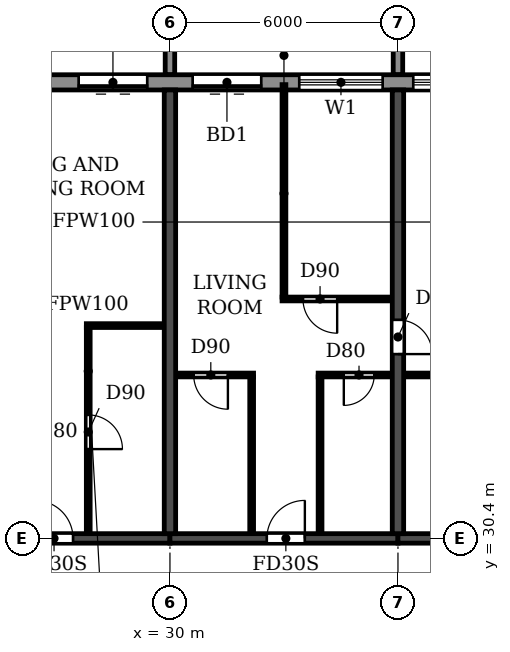
"""IFC4 building model, lengths in metres.
Left out: names, types, materials, properties, quantities, classifications, styles, units other than length and angle.
Written with IfcOpenShell. Run it as: python <this file> out.ifc"""

import sys

from ifc_helpers import new_model, si_unit, direction, frame, frame_2d, origin, place, context, subcontext, project, spatial, polyline, rectangle, outline, extrude, source, transform, mapped, element, fill, save


model = new_model("IFC4")
c1 = context("Model", 3, precision=1e-05, world=origin(), true_north=direction((0.0, 1.0)))
c2 = subcontext(c1, "Body", "Model", "MODEL_VIEW")
j1 = project(units=[si_unit("LENGTHUNIT", "METRE"), si_unit("PLANEANGLEUNIT", "RADIAN")], contexts=[c1])
p1 = place(None, origin())
s1 = spatial("IfcSite", under=j1, at=p1, CompositionType="ELEMENT")
p2 = place(p1, origin())
s2 = spatial("IfcBuilding", under=s1, at=p2, CompositionType="ELEMENT")
p3 = place(p2, frame((0.0, 0.0, 155.4)))
s3 = spatial("IfcBuildingStorey", under=s2, at=p3, CompositionType="ELEMENT", Elevation=155.4)
p4 = place(p3, frame((30.0, 30.525, 0.0), z_axis=(0.0, 0.0, 1.0), x_axis=(0.0, 1.0, 0.0)))
e1 = element("IfcWall", 1, at=p4, inside=s3, PredefinedType="SHEAR", context=c2, shape_type="SweptSolid", body=[
    extrude(rectangle(XDim=11.675, YDim=0.3, at=frame_2d((5.837, 0.0))), origin(), (0.0, 0.0, 1.0), 3.0),
])
p5 = place(p3, frame((36.0, 30.525, 0.0), z_axis=(0.0, 0.0, 1.0), x_axis=(0.0, 1.0, 0.0)))
e2 = element("IfcWall", 2, at=p5, inside=s3, PredefinedType="SHEAR", context=c2, shape_type="SweptSolid", body=[
    extrude(rectangle(XDim=11.675, YDim=0.3, at=frame_2d((5.837, 0.0))), origin(), (0.0, 0.0, 1.0), 3.0),
])
p6 = place(p5, frame((4.725, 0.0, 0.0)))
e3 = element("IfcOpeningElement", 3, at=p6, cuts=e2, PredefinedType="OPENING", context=c2, shape_type="SweptSolid", body=[
    extrude(rectangle(XDim=0.9, YDim=2.1, at=frame_2d((0.45, 1.05))), frame((0.0, 0.16, 0.0), z_axis=(0.0, -1.0, 0.0), x_axis=(1.0, 0.0, 0.0)), (0.0, 0.0, 1.0), 0.32),
])
p7 = place(p3, frame((24.0, 30.4, 0.0), z_axis=(0.0, 0.0, 1.0), x_axis=(1.0, 0.0, 0.0)))
e4 = element("IfcWall", 4, at=p7, inside=s3, PredefinedType="SHEAR", context=c2, shape_type="SweptSolid", body=[
    extrude(rectangle(XDim=6.0, YDim=0.25, at=frame_2d((3.0, 0.0))), origin(), (0.0, 0.0, 1.0), 2.4),
])
p8 = place(p7, frame((2.45, 0.0, 0.0)))
e5 = element("IfcOpeningElement", 5, at=p8, cuts=e4, PredefinedType="OPENING", context=c2, shape_type="SweptSolid", body=[
    extrude(rectangle(XDim=1.0, YDim=2.1, at=frame_2d((0.5, 1.05))), frame((0.0, 0.135, 0.0), z_axis=(0.0, -1.0, 0.0), x_axis=(1.0, 0.0, 0.0)), (0.0, 0.0, 1.0), 0.27),
])
p9 = place(p3, frame((30.0, 30.4, 0.0), z_axis=(0.0, 0.0, 1.0), x_axis=(1.0, 0.0, 0.0)))
e6 = element("IfcWall", 6, at=p9, inside=s3, PredefinedType="SHEAR", context=c2, shape_type="SweptSolid", body=[
    extrude(rectangle(XDim=6.0, YDim=0.25, at=frame_2d((3.0, 0.0))), origin(), (0.0, 0.0, 1.0), 2.4),
])
p10 = place(p9, frame((2.55, 0.0, 0.0)))
e7 = element("IfcOpeningElement", 7, at=p10, cuts=e6, PredefinedType="OPENING", context=c2, shape_type="SweptSolid", body=[
    extrude(rectangle(XDim=1.0, YDim=2.1, at=frame_2d((0.5, 1.05))), frame((0.0, 0.135, 0.0), z_axis=(0.0, -1.0, 0.0), x_axis=(1.0, 0.0, 0.0)), (0.0, 0.0, 1.0), 0.27),
])
p11 = place(p3, frame((36.0, 30.4, 0.0), z_axis=(0.0, 0.0, 1.0), x_axis=(1.0, 0.0, 0.0)))
e8 = element("IfcWall", 8, at=p11, inside=s3, PredefinedType="SHEAR", context=c2, shape_type="SweptSolid", body=[
    extrude(rectangle(XDim=6.0, YDim=0.25, at=frame_2d((3.0, 0.0))), origin(), (0.0, 0.0, 1.0), 2.4),
])
p12 = place(p3, frame((85.317, 42.4, 0.0), z_axis=(0.0, 0.0, 1.0), x_axis=(-1.0, 0.0, 0.0)))
e9 = element("IfcWall", 9, at=p12, inside=s3, PredefinedType="STANDARD", context=c2, shape_type="SweptSolid", body=[
    extrude(rectangle(XDim=68.634, YDim=0.4, at=frame_2d((34.317, 0.0))), origin(), (0.0, 0.0, 1.0), 3.0),
])
p13 = place(p12, frame((64.917, 0.0, 0.0)))
e10 = element("IfcOpeningElement", 10, at=p13, cuts=e9, PredefinedType="OPENING", context=c2, shape_type="SweptSolid", body=[
    extrude(rectangle(XDim=1.8, YDim=2.4, at=frame_2d((0.9, 1.2))), frame((0.0, 0.21, 0.0), z_axis=(0.0, -1.0, 0.0), x_axis=(1.0, 0.0, 0.0)), (0.0, 0.0, 1.0), 0.42),
])
p14 = place(p12, frame((61.717, 0.0, 0.9)))
e11 = element("IfcOpeningElement", 11, at=p14, cuts=e9, PredefinedType="OPENING", context=c2, shape_type="SweptSolid", body=[
    extrude(rectangle(XDim=2.2, YDim=1.5, at=frame_2d((1.1, 0.75))), frame((0.0, 0.21, 0.0), z_axis=(0.0, -1.0, 0.0), x_axis=(1.0, 0.0, 0.0)), (0.0, 0.0, 1.0), 0.42),
])
p15 = place(p12, frame((58.717, 0.0, 0.9)))
e12 = element("IfcOpeningElement", 12, at=p15, cuts=e9, PredefinedType="OPENING", context=c2, shape_type="SweptSolid", body=[
    extrude(rectangle(XDim=2.2, YDim=1.5, at=frame_2d((1.1, 0.75))), frame((0.0, 0.21, 0.0), z_axis=(0.0, -1.0, 0.0), x_axis=(1.0, 0.0, 0.0)), (0.0, 0.0, 1.0), 0.42),
])
p16 = place(p12, frame((55.917, 0.0, 0.0)))
e13 = element("IfcOpeningElement", 13, at=p16, cuts=e9, PredefinedType="OPENING", context=c2, shape_type="SweptSolid", body=[
    extrude(rectangle(XDim=1.8, YDim=2.4, at=frame_2d((0.9, 1.2))), frame((0.0, 0.21, 0.0), z_axis=(0.0, -1.0, 0.0), x_axis=(1.0, 0.0, 0.0)), (0.0, 0.0, 1.0), 0.42),
])
p17 = place(p12, frame((52.917, 0.0, 0.0)))
e14 = element("IfcOpeningElement", 14, at=p17, cuts=e9, PredefinedType="OPENING", context=c2, shape_type="SweptSolid", body=[
    extrude(rectangle(XDim=1.8, YDim=2.4, at=frame_2d((0.9, 1.2))), frame((0.0, 0.21, 0.0), z_axis=(0.0, -1.0, 0.0), x_axis=(1.0, 0.0, 0.0)), (0.0, 0.0, 1.0), 0.42),
])
p18 = place(p12, frame((49.717, 0.0, 0.9)))
e15 = element("IfcOpeningElement", 15, at=p18, cuts=e9, PredefinedType="OPENING", context=c2, shape_type="SweptSolid", body=[
    extrude(rectangle(XDim=2.2, YDim=1.5, at=frame_2d((1.1, 0.75))), frame((0.0, 0.21, 0.0), z_axis=(0.0, -1.0, 0.0), x_axis=(1.0, 0.0, 0.0)), (0.0, 0.0, 1.0), 0.42),
])
p19 = place(p12, frame((46.717, 0.0, 0.9)))
e16 = element("IfcOpeningElement", 16, at=p19, cuts=e9, PredefinedType="OPENING", context=c2, shape_type="SweptSolid", body=[
    extrude(rectangle(XDim=2.2, YDim=1.5, at=frame_2d((1.1, 0.75))), frame((0.0, 0.21, 0.0), z_axis=(0.0, -1.0, 0.0), x_axis=(1.0, 0.0, 0.0)), (0.0, 0.0, 1.0), 0.42),
])
p20 = place(p12, frame((43.717, 0.0, 0.9)))
e17 = element("IfcOpeningElement", 17, at=p20, cuts=e9, PredefinedType="OPENING", context=c2, shape_type="SweptSolid", body=[
    extrude(rectangle(XDim=2.2, YDim=1.5, at=frame_2d((1.1, 0.75))), frame((0.0, 0.21, 0.0), z_axis=(0.0, -1.0, 0.0), x_axis=(1.0, 0.0, 0.0)), (0.0, 0.0, 1.0), 0.42),
])
p21 = place(p12, frame((40.917, 0.0, 0.0)))
e18 = element("IfcOpeningElement", 18, at=p21, cuts=e9, PredefinedType="OPENING", context=c2, shape_type="SweptSolid", body=[
    extrude(rectangle(XDim=1.8, YDim=2.4, at=frame_2d((0.9, 1.2))), frame((0.0, 0.21, 0.0), z_axis=(0.0, -1.0, 0.0), x_axis=(1.0, 0.0, 0.0)), (0.0, 0.0, 1.0), 0.42),
])
p22 = place(p12, frame((37.717, 0.0, 0.9)))
e19 = element("IfcOpeningElement", 19, at=p22, cuts=e9, PredefinedType="OPENING", context=c2, shape_type="SweptSolid", body=[
    extrude(rectangle(XDim=2.2, YDim=1.5, at=frame_2d((1.1, 0.75))), frame((0.0, 0.21, 0.0), z_axis=(0.0, -1.0, 0.0), x_axis=(1.0, 0.0, 0.0)), (0.0, 0.0, 1.0), 0.42),
])
p23 = place(p12, frame((34.917, 0.0, 0.0)))
e20 = element("IfcOpeningElement", 20, at=p23, cuts=e9, PredefinedType="OPENING", context=c2, shape_type="SweptSolid", body=[
    extrude(rectangle(XDim=1.8, YDim=2.4, at=frame_2d((0.9, 1.2))), frame((0.0, 0.21, 0.0), z_axis=(0.0, -1.0, 0.0), x_axis=(1.0, 0.0, 0.0)), (0.0, 0.0, 1.0), 0.42),
])
p24 = place(p12, frame((31.717, 0.0, 0.9)))
e21 = element("IfcOpeningElement", 21, at=p24, cuts=e9, PredefinedType="OPENING", context=c2, shape_type="SweptSolid", body=[
    extrude(rectangle(XDim=2.2, YDim=1.5, at=frame_2d((1.1, 0.75))), frame((0.0, 0.21, 0.0), z_axis=(0.0, -1.0, 0.0), x_axis=(1.0, 0.0, 0.0)), (0.0, 0.0, 1.0), 0.42),
])
p25 = place(p12, frame((28.717, 0.0, 0.9)))
e22 = element("IfcOpeningElement", 22, at=p25, cuts=e9, PredefinedType="OPENING", context=c2, shape_type="SweptSolid", body=[
    extrude(rectangle(XDim=2.2, YDim=1.5, at=frame_2d((1.1, 0.75))), frame((0.0, 0.21, 0.0), z_axis=(0.0, -1.0, 0.0), x_axis=(1.0, 0.0, 0.0)), (0.0, 0.0, 1.0), 0.42),
])
p26 = place(p12, frame((25.717, 0.0, 0.9)))
e23 = element("IfcOpeningElement", 23, at=p26, cuts=e9, PredefinedType="OPENING", context=c2, shape_type="SweptSolid", body=[
    extrude(rectangle(XDim=2.2, YDim=1.5, at=frame_2d((1.1, 0.75))), frame((0.0, 0.21, 0.0), z_axis=(0.0, -1.0, 0.0), x_axis=(1.0, 0.0, 0.0)), (0.0, 0.0, 1.0), 0.42),
])
p27 = place(p12, frame((22.717, 0.0, 0.9)))
e24 = element("IfcOpeningElement", 24, at=p27, cuts=e9, PredefinedType="OPENING", context=c2, shape_type="SweptSolid", body=[
    extrude(rectangle(XDim=2.2, YDim=1.5, at=frame_2d((1.1, 0.75))), frame((0.0, 0.21, 0.0), z_axis=(0.0, -1.0, 0.0), x_axis=(1.0, 0.0, 0.0)), (0.0, 0.0, 1.0), 0.42),
])
p28 = place(p12, frame((19.917, 0.0, 0.0)))
e25 = element("IfcOpeningElement", 25, at=p28, cuts=e9, PredefinedType="OPENING", context=c2, shape_type="SweptSolid", body=[
    extrude(rectangle(XDim=1.8, YDim=2.4, at=frame_2d((0.9, 1.2))), frame((0.0, 0.21, 0.0), z_axis=(0.0, -1.0, 0.0), x_axis=(1.0, 0.0, 0.0)), (0.0, 0.0, 1.0), 0.42),
])
p29 = place(p12, frame((16.717, 0.0, 0.9)))
e26 = element("IfcOpeningElement", 26, at=p29, cuts=e9, PredefinedType="OPENING", context=c2, shape_type="SweptSolid", body=[
    extrude(rectangle(XDim=2.2, YDim=1.5, at=frame_2d((1.1, 0.75))), frame((0.0, 0.21, 0.0), z_axis=(0.0, -1.0, 0.0), x_axis=(1.0, 0.0, 0.0)), (0.0, 0.0, 1.0), 0.42),
])
p30 = place(p12, frame((13.717, 0.0, 0.9)))
e27 = element("IfcOpeningElement", 27, at=p30, cuts=e9, PredefinedType="OPENING", context=c2, shape_type="SweptSolid", body=[
    extrude(rectangle(XDim=2.2, YDim=1.5, at=frame_2d((1.1, 0.75))), frame((0.0, 0.21, 0.0), z_axis=(0.0, -1.0, 0.0), x_axis=(1.0, 0.0, 0.0)), (0.0, 0.0, 1.0), 0.42),
])
p31 = place(p12, frame((10.917, 0.0, 0.0)))
e28 = element("IfcOpeningElement", 28, at=p31, cuts=e9, PredefinedType="OPENING", context=c2, shape_type="SweptSolid", body=[
    extrude(rectangle(XDim=1.8, YDim=2.4, at=frame_2d((0.9, 1.2))), frame((0.0, 0.21, 0.0), z_axis=(0.0, -1.0, 0.0), x_axis=(1.0, 0.0, 0.0)), (0.0, 0.0, 1.0), 0.42),
])
p32 = place(p12, frame((7.717, 0.0, 0.9)))
e29 = element("IfcOpeningElement", 29, at=p32, cuts=e9, PredefinedType="OPENING", context=c2, shape_type="SweptSolid", body=[
    extrude(rectangle(XDim=2.2, YDim=1.5, at=frame_2d((1.1, 0.75))), frame((0.0, 0.21, 0.0), z_axis=(0.0, -1.0, 0.0), x_axis=(1.0, 0.0, 0.0)), (0.0, 0.0, 1.0), 0.42),
])
p33 = place(p12, frame((4.717, 0.0, 0.9)))
e30 = element("IfcOpeningElement", 30, at=p33, cuts=e9, PredefinedType="OPENING", context=c2, shape_type="SweptSolid", body=[
    extrude(rectangle(XDim=2.2, YDim=1.5, at=frame_2d((1.1, 0.75))), frame((0.0, 0.21, 0.0), z_axis=(0.0, -1.0, 0.0), x_axis=(1.0, 0.0, 0.0)), (0.0, 0.0, 1.0), 0.42),
])
p34 = place(p12, frame((1.917, 0.0, 0.0)))
e31 = element("IfcOpeningElement", 31, at=p34, cuts=e9, PredefinedType="OPENING", context=c2, shape_type="SweptSolid", body=[
    extrude(rectangle(XDim=1.8, YDim=2.4, at=frame_2d((0.9, 1.2))), frame((0.0, 0.21, 0.0), z_axis=(0.0, -1.0, 0.0), x_axis=(1.0, 0.0, 0.0)), (0.0, 0.0, 1.0), 0.42),
])
m1 = source(origin(), c2, "Body", "SweptSolid", [
    extrude(outline(polyline([(0.0, 0.0), (0.25, 0.0), (0.25, 3.1), (0.0, 3.1), (0.0, 0.0)])), origin(), (0.0, 0.0, 1.0), 3.1),
])
for number, where in (
    (32, (29.875, 42.6, 0.0)),
    (33, (35.875, 42.6, 0.0)),
):
    element("IfcWall", number, at=place(p3, frame(where)), inside=s3, PredefinedType="STANDARD", context=c2, shape_type="MappedRepresentation", body=[
        mapped(m1, transform((0.0, 0.0, 0.0))),
    ])
p35 = place(p3, frame((30.16, 34.7, 0.0), z_axis=(0.0, 0.0, 1.0), x_axis=(1.0, 0.0, 0.0)))
e34 = element("IfcWall", 34, at=p35, inside=s3, PredefinedType="PARTITIONING", context=c2, shape_type="SweptSolid", body=[
    extrude(rectangle(XDim=2.04, YDim=0.1, at=frame_2d((1.02, 0.0))), origin(), (0.0, 0.0, 1.0), 3.0),
])
p36 = place(p35, frame((0.465, 0.0, 0.0)))
e35 = element("IfcOpeningElement", 35, at=p36, cuts=e34, PredefinedType="OPENING", context=c2, shape_type="SweptSolid", body=[
    extrude(rectangle(XDim=0.9, YDim=2.1, at=frame_2d((0.45, 1.05))), frame((0.0, 0.06, 0.0), z_axis=(0.0, -1.0, 0.0), x_axis=(1.0, 0.0, 0.0)), (0.0, 0.0, 1.0), 0.12),
])
p37 = place(p3, frame((33.9, 34.7, 0.0), z_axis=(0.0, 0.0, 1.0), x_axis=(1.0, 0.0, 0.0)))
e36 = element("IfcWall", 36, at=p37, inside=s3, PredefinedType="PARTITIONING", context=c2, shape_type="SweptSolid", body=[
    extrude(rectangle(XDim=1.94, YDim=0.1, at=frame_2d((0.97, 0.0))), origin(), (0.0, 0.0, 1.0), 3.0),
])
p38 = place(p37, frame((0.675, 0.0, 0.0)))
e37 = element("IfcOpeningElement", 37, at=p38, cuts=e36, PredefinedType="OPENING", context=c2, shape_type="SweptSolid", body=[
    extrude(rectangle(XDim=0.8, YDim=2.1, at=frame_2d((0.4, 1.05))), frame((0.0, 0.06, 0.0), z_axis=(0.0, -1.0, 0.0), x_axis=(1.0, 0.0, 0.0)), (0.0, 0.0, 1.0), 0.12),
])
p39 = place(p3, frame((36.16, 34.7, 0.0), z_axis=(0.0, 0.0, 1.0), x_axis=(1.0, 0.0, 0.0)))
e38 = element("IfcWall", 38, at=p39, inside=s3, PredefinedType="PARTITIONING", context=c2, shape_type="SweptSolid", body=[
    extrude(rectangle(XDim=2.94, YDim=0.1, at=frame_2d((1.47, 0.0))), origin(), (0.0, 0.0, 1.0), 3.0),
])
p40 = place(p39, frame((0.94, 0.0, 0.0)))
e39 = element("IfcOpeningElement", 39, at=p40, cuts=e38, PredefinedType="OPENING", context=c2, shape_type="SweptSolid", body=[
    extrude(rectangle(XDim=0.8, YDim=2.1, at=frame_2d((0.4, 1.05))), frame((0.0, 0.06, 0.0), z_axis=(0.0, -1.0, 0.0), x_axis=(1.0, 0.0, 0.0)), (0.0, 0.0, 1.0), 0.12),
])
p41 = place(p3, frame((27.8, 36.0, 0.0), z_axis=(0.0, 0.0, 1.0), x_axis=(1.0, 0.0, 0.0)))
e40 = element("IfcWall", 40, at=p41, inside=s3, PredefinedType="PARTITIONING", context=c2, shape_type="SweptSolid", body=[
    extrude(rectangle(XDim=2.04, YDim=0.1, at=frame_2d((1.02, 0.0))), origin(), (0.0, 0.0, 1.0), 3.0),
])
p42 = place(p3, frame((32.95, 36.7, 0.0), z_axis=(0.0, 0.0, 1.0), x_axis=(1.0, 0.0, 0.0)))
e41 = element("IfcWall", 41, at=p42, inside=s3, PredefinedType="PARTITIONING", context=c2, shape_type="SweptSolid", body=[
    extrude(rectangle(XDim=2.89, YDim=0.1, at=frame_2d((1.445, 0.0))), origin(), (0.0, 0.0, 1.0), 3.0),
])
p43 = place(p42, frame((0.55, 0.0, 0.0)))
e42 = element("IfcOpeningElement", 42, at=p43, cuts=e41, PredefinedType="OPENING", context=c2, shape_type="SweptSolid", body=[
    extrude(rectangle(XDim=0.9, YDim=2.1, at=frame_2d((0.45, 1.05))), frame((0.0, 0.06, 0.0), z_axis=(0.0, -1.0, 0.0), x_axis=(1.0, 0.0, 0.0)), (0.0, 0.0, 1.0), 0.12),
])
p44 = place(p3, frame((27.85, 30.535, 0.0), z_axis=(0.0, 0.0, 1.0), x_axis=(0.0, 1.0, 0.0)))
e43 = element("IfcWall", 43, at=p44, inside=s3, PredefinedType="PARTITIONING", context=c2, shape_type="SweptSolid", body=[
    extrude(rectangle(XDim=5.415, YDim=0.1, at=frame_2d((2.708, 0.0))), origin(), (0.0, 0.0, 1.0), 3.0),
])
p45 = place(p44, frame((2.215, 0.0, 0.0)))
e44 = element("IfcOpeningElement", 44, at=p45, cuts=e43, PredefinedType="OPENING", context=c2, shape_type="SweptSolid", body=[
    extrude(rectangle(XDim=0.9, YDim=2.1, at=frame_2d((0.45, 1.05))), frame((0.0, 0.06, 0.0), z_axis=(0.0, -1.0, 0.0), x_axis=(1.0, 0.0, 0.0)), (0.0, 0.0, 1.0), 0.12),
])
p46 = place(p3, frame((32.15, 30.535, 0.0), z_axis=(0.0, 0.0, 1.0), x_axis=(0.0, 1.0, 0.0)))
e45 = element("IfcWall", 45, at=p46, inside=s3, PredefinedType="PARTITIONING", context=c2, shape_type="SweptSolid", body=[
    extrude(rectangle(XDim=4.115, YDim=0.1, at=frame_2d((2.058, 0.0))), origin(), (0.0, 0.0, 1.0), 3.0),
])
p47 = place(p3, frame((33.0, 36.75, 0.0), z_axis=(0.0, 0.0, 1.0), x_axis=(0.0, 1.0, 0.0)))
e46 = element("IfcWall", 46, at=p47, inside=s3, PredefinedType="PARTITIONING", context=c2, shape_type="SweptSolid", body=[
    extrude(rectangle(XDim=5.59, YDim=0.1, at=frame_2d((2.795, 0.0))), origin(), (0.0, 0.0, 1.0), 3.0),
])
p48 = place(p3, frame((33.95, 30.535, 0.0), z_axis=(0.0, 0.0, 1.0), x_axis=(0.0, 1.0, 0.0)))
e47 = element("IfcWall", 47, at=p48, inside=s3, PredefinedType="PARTITIONING", context=c2, shape_type="SweptSolid", body=[
    extrude(rectangle(XDim=4.115, YDim=0.1, at=frame_2d((2.058, 0.0))), origin(), (0.0, 0.0, 1.0), 3.0),
])
p49 = place(p16, origin())
e48 = element("IfcDoor", 48, at=p49, inside=s3, OperationType="DOUBLE_DOOR_SLIDING", PredefinedType="DOOR", context=c2, shape_type="SweptSolid", body=[
    extrude(rectangle(XDim=1.8, YDim=2.4, at=frame_2d((0.9, 1.2))), frame((0.0, 0.025, 0.0), z_axis=(0.0, -1.0, 0.0), x_axis=(1.0, 0.0, 0.0)), (0.0, 0.0, 1.0), 0.05),
])
fill(e13, e48)
p50 = place(p17, origin())
e49 = element("IfcDoor", 49, at=p50, inside=s3, OperationType="DOUBLE_DOOR_SLIDING", PredefinedType="DOOR", context=c2, shape_type="SweptSolid", body=[
    extrude(rectangle(XDim=1.8, YDim=2.4, at=frame_2d((0.9, 1.2))), frame((0.0, 0.025, 0.0), z_axis=(0.0, -1.0, 0.0), x_axis=(1.0, 0.0, 0.0)), (0.0, 0.0, 1.0), 0.05),
])
fill(e14, e49)
p51 = place(p18, origin())
e50 = element("IfcWindow", 50, at=p51, inside=s3, PartitioningType="DOUBLE_PANEL_HORIZONTAL", PredefinedType="WINDOW", context=c2, shape_type="SweptSolid", body=[
    extrude(rectangle(XDim=2.2, YDim=1.5, at=frame_2d((1.1, 0.75))), frame((0.0, 0.03, 0.0), z_axis=(0.0, -1.0, 0.0), x_axis=(1.0, 0.0, 0.0)), (0.0, 0.0, 1.0), 0.06),
])
fill(e15, e50)
p52 = place(p19, origin())
e51 = element("IfcWindow", 51, at=p52, inside=s3, PartitioningType="DOUBLE_PANEL_HORIZONTAL", PredefinedType="WINDOW", context=c2, shape_type="SweptSolid", body=[
    extrude(rectangle(XDim=2.2, YDim=1.5, at=frame_2d((1.1, 0.75))), frame((0.0, 0.03, 0.0), z_axis=(0.0, -1.0, 0.0), x_axis=(1.0, 0.0, 0.0)), (0.0, 0.0, 1.0), 0.06),
])
fill(e16, e51)
p53 = place(p8, origin())
e52 = element("IfcDoor", 52, at=p53, inside=s3, OperationType="SINGLE_SWING_LEFT", PredefinedType="DOOR", context=c2, shape_type="SweptSolid", body=[
    extrude(rectangle(XDim=1.0, YDim=2.1, at=frame_2d((0.5, 1.05))), frame((0.0, 0.025, 0.0), z_axis=(0.0, -1.0, 0.0), x_axis=(1.0, 0.0, 0.0)), (0.0, 0.0, 1.0), 0.05),
])
fill(e5, e52)
p54 = place(p45, frame((0.9, 0.0, 0.0), z_axis=(0.0, 0.0, 1.0), x_axis=(-1.0, 0.0, 0.0)))
e53 = element("IfcDoor", 53, at=p54, inside=s3, OperationType="SINGLE_SWING_RIGHT", PredefinedType="DOOR", context=c2, shape_type="SweptSolid", body=[
    extrude(rectangle(XDim=0.9, YDim=2.1, at=frame_2d((0.45, 1.05))), frame((0.0, 0.025, 0.0), z_axis=(0.0, -1.0, 0.0), x_axis=(1.0, 0.0, 0.0)), (0.0, 0.0, 1.0), 0.05),
])
fill(e44, e53)
p55 = place(p36, frame((0.9, 0.0, 0.0), z_axis=(0.0, 0.0, 1.0), x_axis=(-1.0, 0.0, 0.0)))
e54 = element("IfcDoor", 54, at=p55, inside=s3, OperationType="SINGLE_SWING_LEFT", PredefinedType="DOOR", context=c2, shape_type="SweptSolid", body=[
    extrude(rectangle(XDim=0.9, YDim=2.1, at=frame_2d((0.45, 1.05))), frame((0.0, 0.025, 0.0), z_axis=(0.0, -1.0, 0.0), x_axis=(1.0, 0.0, 0.0)), (0.0, 0.0, 1.0), 0.05),
])
fill(e35, e54)
p56 = place(p10, origin())
e55 = element("IfcDoor", 55, at=p56, inside=s3, OperationType="SINGLE_SWING_RIGHT", PredefinedType="DOOR", context=c2, shape_type="SweptSolid", body=[
    extrude(rectangle(XDim=1.0, YDim=2.1, at=frame_2d((0.5, 1.05))), frame((0.0, 0.025, 0.0), z_axis=(0.0, -1.0, 0.0), x_axis=(1.0, 0.0, 0.0)), (0.0, 0.0, 1.0), 0.05),
])
fill(e7, e55)
p57 = place(p43, frame((0.9, 0.0, 0.0), z_axis=(0.0, 0.0, 1.0), x_axis=(-1.0, 0.0, 0.0)))
e56 = element("IfcDoor", 56, at=p57, inside=s3, OperationType="SINGLE_SWING_LEFT", PredefinedType="DOOR", context=c2, shape_type="SweptSolid", body=[
    extrude(rectangle(XDim=0.9, YDim=2.1, at=frame_2d((0.45, 1.05))), frame((0.0, 0.025, 0.0), z_axis=(0.0, -1.0, 0.0), x_axis=(1.0, 0.0, 0.0)), (0.0, 0.0, 1.0), 0.05),
])
fill(e42, e56)
p58 = place(p38, frame((0.8, 0.0, 0.0), z_axis=(0.0, 0.0, 1.0), x_axis=(-1.0, 0.0, 0.0)))
e57 = element("IfcDoor", 57, at=p58, inside=s3, OperationType="SINGLE_SWING_RIGHT", PredefinedType="DOOR", context=c2, shape_type="SweptSolid", body=[
    extrude(rectangle(XDim=0.8, YDim=2.1, at=frame_2d((0.4, 1.05))), frame((0.0, 0.025, 0.0), z_axis=(0.0, -1.0, 0.0), x_axis=(1.0, 0.0, 0.0)), (0.0, 0.0, 1.0), 0.05),
])
fill(e37, e57)
p59 = place(p6, frame((0.9, 0.0, 0.0), z_axis=(0.0, 0.0, 1.0), x_axis=(-1.0, 0.0, 0.0)))
e58 = element("IfcDoor", 58, at=p59, inside=s3, OperationType="SINGLE_SWING_RIGHT", PredefinedType="DOOR", context=c2, shape_type="SweptSolid", body=[
    extrude(rectangle(XDim=0.9, YDim=2.1, at=frame_2d((0.45, 1.05))), frame((0.0, 0.025, 0.0), z_axis=(0.0, -1.0, 0.0), x_axis=(1.0, 0.0, 0.0)), (0.0, 0.0, 1.0), 0.05),
])
fill(e3, e58)
save(model, sys.argv[1])
